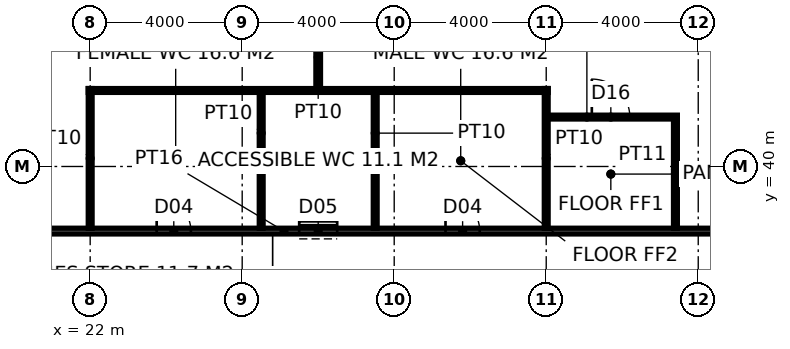
"""IFC4 building model, lengths in metres.
Left out: names, types, materials, properties, quantities, classifications, styles, units other than length and angle.
Written with IfcOpenShell. Run it as: python <this file> out.ifc"""

import sys

from ifc_helpers import new_model, si_unit, direction, frame, frame_2d, origin, place, context, subcontext, project, spatial, rectangle, extrude, element, fill, save


model = new_model("IFC4")
c1 = context("Model", 3, precision=1e-05, world=origin(), true_north=direction((0.0, 1.0)))
c2 = subcontext(c1, "Body", "Model", "MODEL_VIEW")
j1 = project(units=[si_unit("LENGTHUNIT", "METRE"), si_unit("PLANEANGLEUNIT", "RADIAN")], contexts=[c1])
p1 = place(None, origin())
s1 = spatial("IfcSite", under=j1, at=p1, CompositionType="ELEMENT")
p2 = place(p1, origin())
s2 = spatial("IfcBuilding", under=s1, at=p2, CompositionType="ELEMENT")
p3 = place(p2, frame((0.0, 0.0, 254.2)))
s3 = spatial("IfcBuildingStorey", under=s2, at=p3, CompositionType="ELEMENT", Elevation=254.2)
p4 = place(p3, frame((15.775, 38.3, 0.0), z_axis=(0.0, 0.0, 1.0), x_axis=(1.0, 0.0, 0.0)))
e1 = element("IfcWall", 1, at=p4, inside=s3, PredefinedType="PARTITIONING", context=c2, shape_type="SweptSolid", body=[
    extrude(rectangle(XDim=22.65, YDim=0.15, at=frame_2d((11.325, 0.0))), origin(), (0.0, 0.0, 1.0), 3.85),
])
p5 = place(p4, frame((7.975, 0.0, 0.0)))
e2 = element("IfcOpeningElement", 2, at=p5, cuts=e1, PredefinedType="OPENING", context=c2, shape_type="SweptSolid", body=[
    extrude(rectangle(XDim=0.9, YDim=2.1, at=frame_2d((0.45, 1.05))), frame((0.0, 0.085, 0.0), z_axis=(0.0, -1.0, 0.0), x_axis=(1.0, 0.0, 0.0)), (0.0, 0.0, 1.0), 0.17),
])
p6 = place(p4, frame((11.725, 0.0, 0.0)))
e3 = element("IfcOpeningElement", 3, at=p6, cuts=e1, PredefinedType="OPENING", context=c2, shape_type="SweptSolid", body=[
    extrude(rectangle(XDim=1.0, YDim=2.1, at=frame_2d((0.5, 1.05))), frame((0.0, 0.085, 0.0), z_axis=(0.0, -1.0, 0.0), x_axis=(1.0, 0.0, 0.0)), (0.0, 0.0, 1.0), 0.17),
])
p7 = place(p4, frame((15.575, 0.0, 0.0)))
e4 = element("IfcOpeningElement", 4, at=p7, cuts=e1, PredefinedType="OPENING", context=c2, shape_type="SweptSolid", body=[
    extrude(rectangle(XDim=0.9, YDim=2.1, at=frame_2d((0.45, 1.05))), frame((0.0, 0.085, 0.0), z_axis=(0.0, -1.0, 0.0), x_axis=(1.0, 0.0, 0.0)), (0.0, 0.0, 1.0), 0.17),
])
for number, where, z_axis, x_axis in (
    (5, (22.0, 38.375, 0.0), (0.0, 0.0, 1.0), (0.0, 1.0, 0.0)),
    (6, (34.0, 38.375, 0.0), (0.0, 0.0, 1.0), (0.0, 1.0, 0.0)),
):
    element("IfcWall", number, at=place(p3, frame(where, z_axis=z_axis, x_axis=x_axis)), inside=s3, PredefinedType="PARTITIONING", context=c2, shape_type="SweptSolid", body=[
        extrude(rectangle(XDim=3.675, YDim=0.1, at=frame_2d((1.837, 0.0))), origin(), (0.0, 0.0, 1.0), 2.95),
    ])
p8 = place(p3, frame((21.95, 42.0, 0.0), z_axis=(0.0, 0.0, 1.0), x_axis=(1.0, 0.0, 0.0)))
e7 = element("IfcWall", 7, at=p8, inside=s3, PredefinedType="PARTITIONING", context=c2, shape_type="SweptSolid", body=[
    extrude(rectangle(XDim=12.1, YDim=0.1, at=frame_2d((6.05, 0.0))), origin(), (0.0, 0.0, 1.0), 3.85),
])
for number, where, z_axis, x_axis in (
    (8, (26.5, 38.375, 0.0), (0.0, 0.0, 1.0), (0.0, 1.0, 0.0)),
    (9, (29.5, 38.375, 0.0), (0.0, 0.0, 1.0), (0.0, 1.0, 0.0)),
):
    element("IfcWall", number, at=place(p3, frame(where, z_axis=z_axis, x_axis=x_axis)), inside=s3, PredefinedType="PARTITIONING", context=c2, shape_type="SweptSolid", body=[
        extrude(rectangle(XDim=3.575, YDim=0.1, at=frame_2d((1.788, 0.0))), origin(), (0.0, 0.0, 1.0), 3.85),
    ])
p9 = place(p3, frame((28.0, 42.05, 0.0), z_axis=(0.0, 0.0, 1.0), x_axis=(0.0, 1.0, 0.0)))
e10 = element("IfcWall", 10, at=p9, inside=s3, PredefinedType="PARTITIONING", context=c2, shape_type="SweptSolid", body=[
    extrude(rectangle(XDim=1.65, YDim=0.12, at=frame_2d((0.825, 0.0))), origin(), (0.0, 0.0, 1.0), 3.85),
])
p10 = place(p3, frame((34.05, 41.3, 0.0), z_axis=(0.0, 0.0, 1.0), x_axis=(1.0, 0.0, 0.0)))
e11 = element("IfcWall", 11, at=p10, inside=s3, PredefinedType="PARTITIONING", context=c2, shape_type="SweptSolid", body=[
    extrude(rectangle(XDim=3.4, YDim=0.1, at=frame_2d((1.7, 0.0))), origin(), (0.0, 0.0, 1.0), 3.85),
])
p11 = place(p10, frame((1.15, 0.0, 0.0)))
e12 = element("IfcOpeningElement", 12, at=p11, cuts=e11, PredefinedType="OPENING", context=c2, shape_type="SweptSolid", body=[
    extrude(rectangle(XDim=1.0, YDim=2.2, at=frame_2d((0.5, 1.1))), frame((0.0, 0.06, 0.0), z_axis=(0.0, -1.0, 0.0), x_axis=(1.0, 0.0, 0.0)), (0.0, 0.0, 1.0), 0.12),
])
p12 = place(p3, frame((37.4, 38.375, 0.0), z_axis=(0.0, 0.0, 1.0), x_axis=(0.0, 1.0, 0.0)))
e13 = element("IfcWall", 13, at=p12, inside=s3, PredefinedType="PARTITIONING", context=c2, shape_type="SweptSolid", body=[
    extrude(rectangle(XDim=2.875, YDim=0.1, at=frame_2d((1.438, 0.0))), origin(), (0.0, 0.0, 1.0), 3.85),
])
p13 = place(p5, origin())
e14 = element("IfcDoor", 14, at=p13, inside=s3, OperationType="SINGLE_SWING_LEFT", PredefinedType="DOOR", context=c2, shape_type="SweptSolid", body=[
    extrude(rectangle(XDim=0.9, YDim=2.1, at=frame_2d((0.45, 1.05))), frame((0.0, 0.025, 0.0), z_axis=(0.0, -1.0, 0.0), x_axis=(1.0, 0.0, 0.0)), (0.0, 0.0, 1.0), 0.05),
])
fill(e2, e14)
p14 = place(p6, origin())
e15 = element("IfcDoor", 15, at=p14, inside=s3, OperationType="SLIDING_TO_LEFT", PredefinedType="DOOR", context=c2, shape_type="SweptSolid", body=[
    extrude(rectangle(XDim=1.0, YDim=2.1, at=frame_2d((0.5, 1.05))), frame((0.0, 0.025, 0.0), z_axis=(0.0, -1.0, 0.0), x_axis=(1.0, 0.0, 0.0)), (0.0, 0.0, 1.0), 0.05),
])
fill(e3, e15)
p15 = place(p7, origin())
e16 = element("IfcDoor", 16, at=p15, inside=s3, OperationType="SINGLE_SWING_LEFT", PredefinedType="DOOR", context=c2, shape_type="SweptSolid", body=[
    extrude(rectangle(XDim=0.9, YDim=2.1, at=frame_2d((0.45, 1.05))), frame((0.0, 0.025, 0.0), z_axis=(0.0, -1.0, 0.0), x_axis=(1.0, 0.0, 0.0)), (0.0, 0.0, 1.0), 0.05),
])
fill(e4, e16)
p16 = place(p11, origin())
e17 = element("IfcDoor", 17, at=p16, inside=s3, OperationType="SINGLE_SWING_LEFT", PredefinedType="DOOR", context=c2, shape_type="SweptSolid", body=[
    extrude(rectangle(XDim=1.0, YDim=2.2, at=frame_2d((0.5, 1.1))), frame((0.0, 0.025, 0.0), z_axis=(0.0, -1.0, 0.0), x_axis=(1.0, 0.0, 0.0)), (0.0, 0.0, 1.0), 0.05),
])
fill(e12, e17)
save(model, sys.argv[1])
